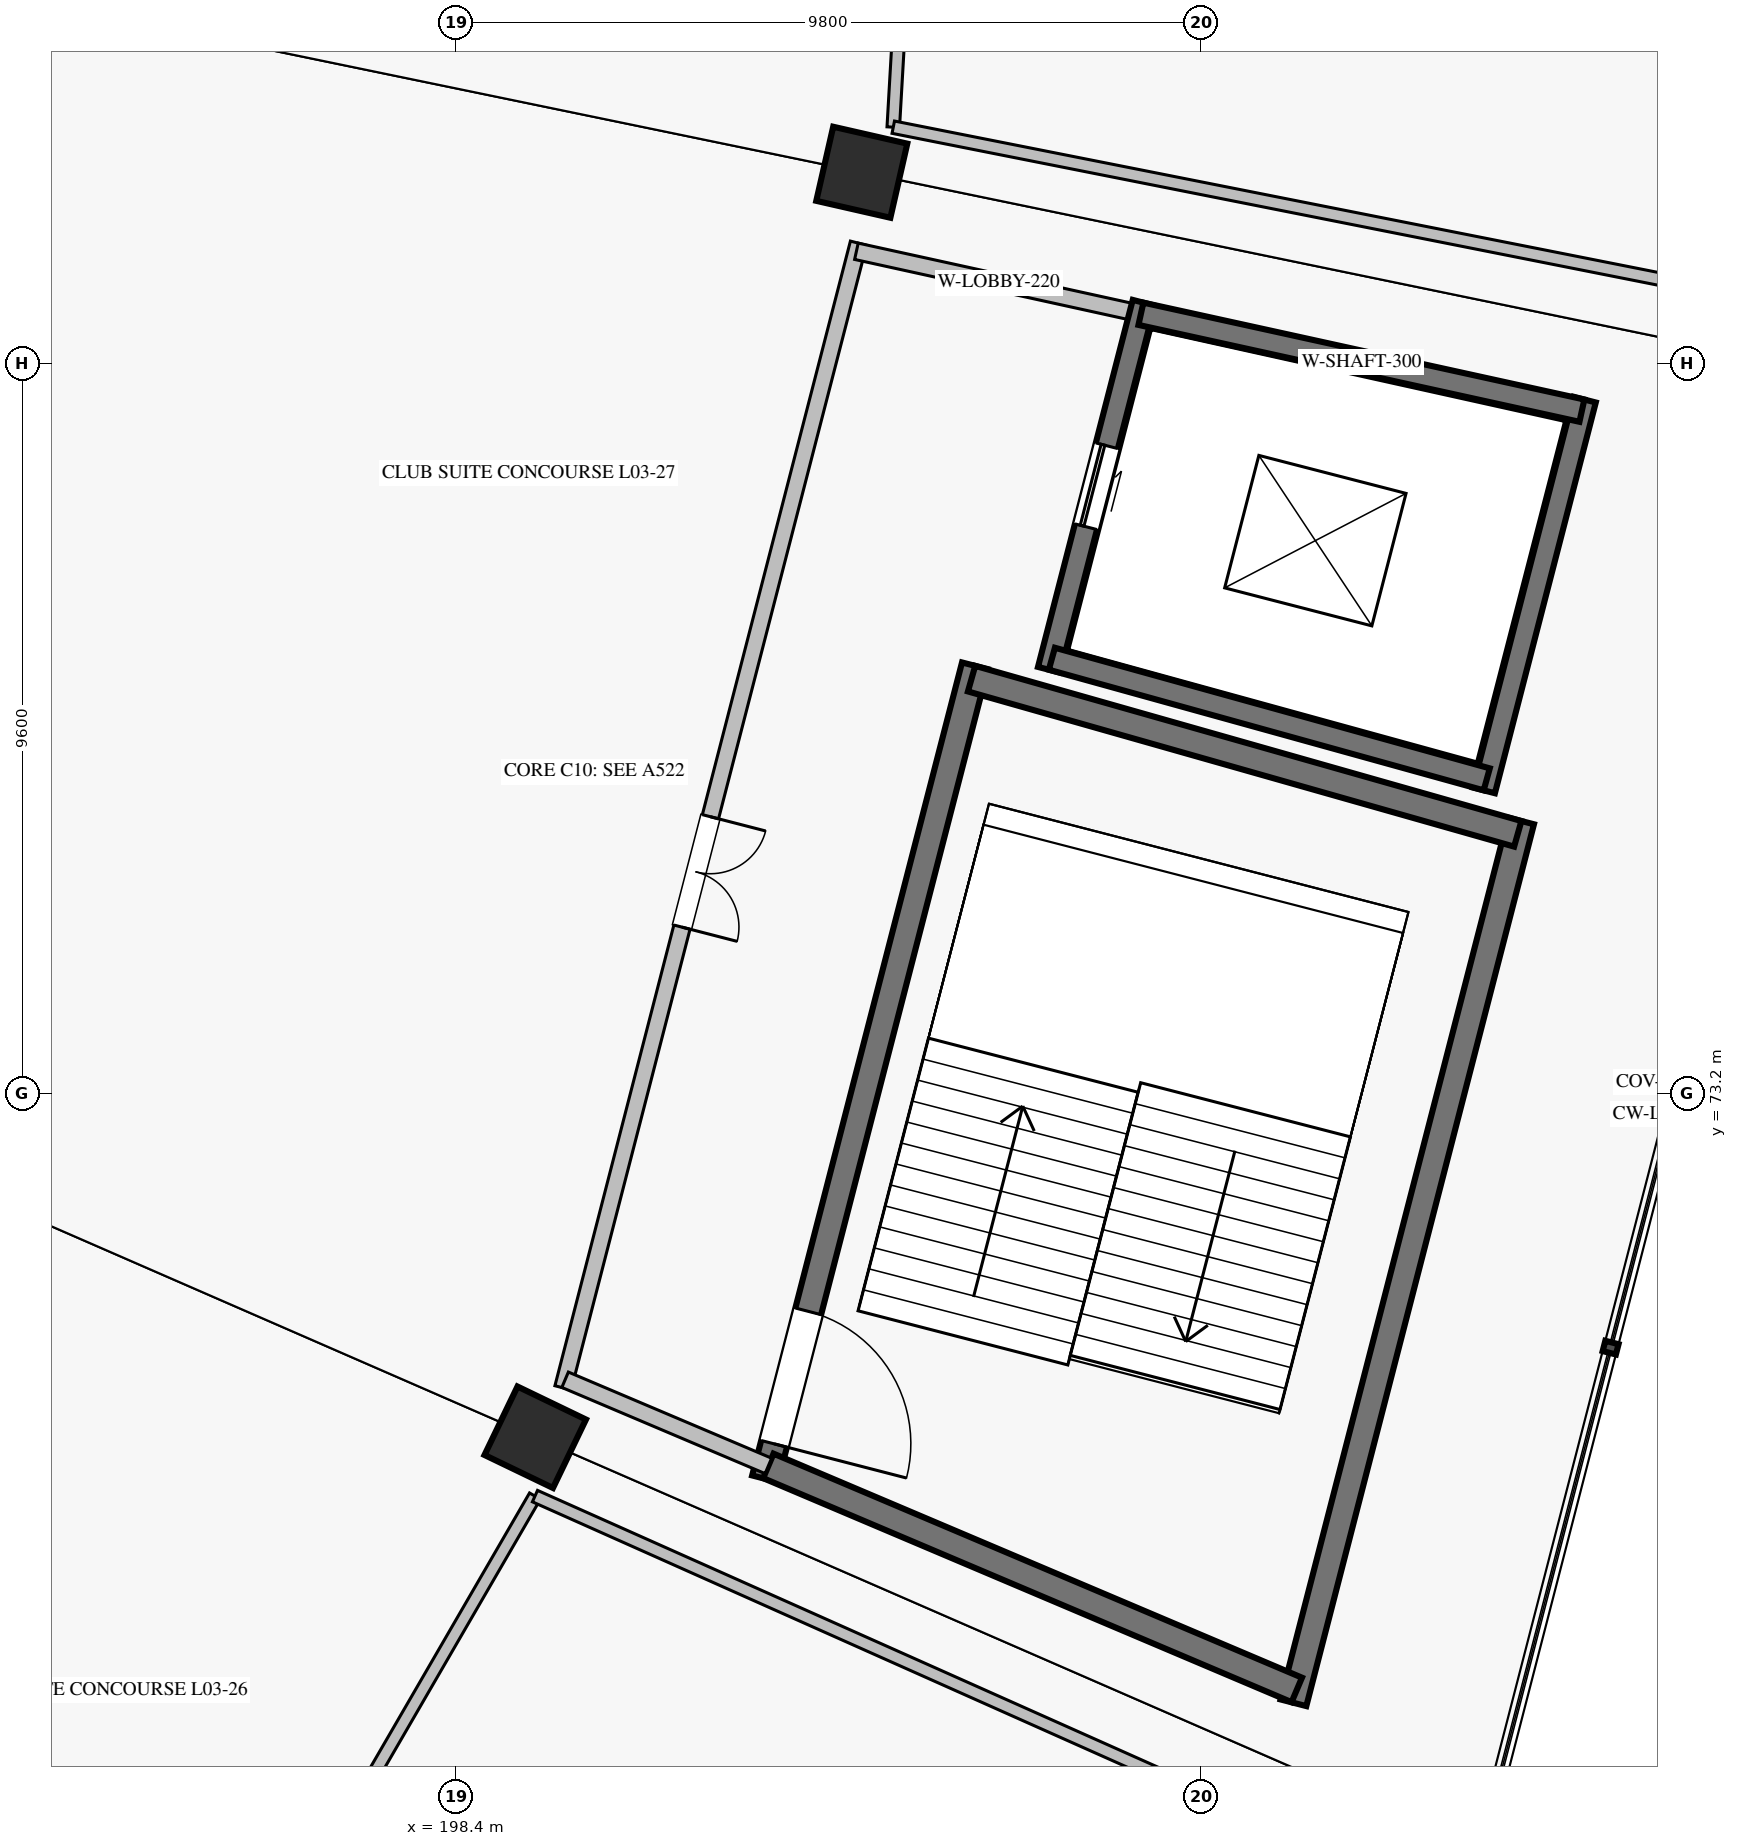
"""IFC4 building model, lengths in metres.
Left out: names, types, materials, properties, quantities, classifications, styles, units other than length and angle.
Written with IfcOpenShell. Run it as: python <this file> out.ifc"""

import sys

from ifc_helpers import new_model, si_unit, direction, frame, frame_2d, origin, origin_2d, place, context, subcontext, project, spatial, rectangle, extrude, element, fill, save


model = new_model("IFC4")
c1 = context("Model", 3, precision=1e-05, world=origin(), true_north=direction((0.0, 1.0)))
c2 = subcontext(c1, "Body", "Model", "MODEL_VIEW")
j1 = project(units=[si_unit("LENGTHUNIT", "METRE"), si_unit("PLANEANGLEUNIT", "RADIAN")], contexts=[c1])
p1 = place(None, origin())
s1 = spatial("IfcSite", under=j1, at=p1, CompositionType="ELEMENT")
p2 = place(p1, origin())
s2 = spatial("IfcBuilding", under=s1, at=p2, CompositionType="ELEMENT")
p3 = place(p2, frame((0.0, 0.0, 15.64)))
s3 = spatial("IfcBuildingStorey", under=s2, at=p3, CompositionType="ELEMENT", Elevation=15.64)
for number, where, z_axis, x_axis in (
    (1, (199.441, 68.675, 0.0), (0.0, 0.0, 1.0), (0.901, -0.434, 0.0)),
    (2, (203.738, 85.318, 0.0), (0.0, 0.0, 1.0), (0.975, -0.223, 0.0)),
):
    element("IfcColumn", number, at=place(p3, frame(where, z_axis=z_axis, x_axis=x_axis)), inside=s3, PredefinedType="COLUMN", context=c2, shape_type="SweptSolid", body=[
        extrude(rectangle(XDim=1.0, YDim=1.0, at=origin_2d()), origin(), (0.0, 0.0, 1.0), 4.76),
    ])
p4 = place(p3, frame((202.464, 68.129, 0.0), z_axis=(0.0, 0.0, 1.0), x_axis=(0.249959564539, 0.968256276042, 0.0)))
e3 = element("IfcWall", 3, at=p4, inside=s3, PredefinedType="SHEAR", context=c2, shape_type="SweptSolid", body=[
    extrude(rectangle(XDim=11.047, YDim=0.35, at=frame_2d((5.523, 0.0))), origin(), (0.0, 0.0, 1.0), 4.46),
])
p5 = place(p4, frame((0.475, 0.0, 0.0)))
e4 = element("IfcOpeningElement", 4, at=p5, cuts=e3, PredefinedType="OPENING", context=c2, shape_type="SweptSolid", body=[
    extrude(rectangle(XDim=1.8, YDim=2.2, at=frame_2d((0.9, 1.1))), frame((0.0, 0.185, 0.0), z_axis=(0.0, -1.0, 0.0), x_axis=(1.0, 0.0, 0.0)), (0.0, 0.0, 1.0), 0.37),
])
p6 = place(p3, frame((209.417, 65.182, 0.0), z_axis=(0.0, 0.0, 1.0), x_axis=(0.249969221583, 0.968253782983, 0.0)))
e5 = element("IfcWall", 5, at=p6, inside=s3, PredefinedType="SHEAR", context=c2, shape_type="SweptSolid", body=[
    extrude(rectangle(XDim=11.982, YDim=0.35, at=frame_2d((5.991, 0.0))), origin(), (0.0, 0.0, 1.0), 4.46),
])
p7 = place(p3, frame((202.508, 68.299, 0.0), z_axis=(0.0, 0.0, 1.0), x_axis=(0.920704667209, -0.390260061728, 0.0)))
e6 = element("IfcWall", 6, at=p7, inside=s3, PredefinedType="SHEAR", context=c2, shape_type="SweptSolid", body=[
    extrude(rectangle(XDim=7.552, YDim=0.35, at=frame_2d((3.776, 0.0))), origin(), (0.0, 0.0, 1.0), 4.46),
])
p8 = place(p3, frame((205.182, 78.656, 0.0), z_axis=(0.0, 0.0, 1.0), x_axis=(0.961945802461, -0.273240321195, 0.0)))
e7 = element("IfcWall", 7, at=p8, inside=s3, PredefinedType="SHEAR", context=c2, shape_type="SweptSolid", body=[
    extrude(rectangle(XDim=7.47, YDim=0.35, at=frame_2d((3.735, 0.0))), origin(), (0.0, 0.0, 1.0), 4.46),
])
p9 = place(p3, frame((206.201, 78.772, 0.0), z_axis=(0.0, 0.0, 1.0), x_axis=(0.249946120621, 0.968259746549, 0.0)))
e8 = element("IfcWall", 8, at=p9, inside=s3, PredefinedType="SHEAR", context=c2, shape_type="SweptSolid", body=[
    extrude(rectangle(XDim=4.987, YDim=0.3, at=frame_2d((2.494, 0.0))), origin(), (0.0, 0.0, 1.0), 4.46),
])
p10 = place(p9, frame((1.944, 0.0, 0.0)))
e9 = element("IfcOpeningElement", 9, at=p10, cuts=e8, PredefinedType="OPENING", context=c2, shape_type="SweptSolid", body=[
    extrude(rectangle(XDim=1.1, YDim=2.2, at=frame_2d((0.55, 1.1))), frame((0.0, 0.16, 0.0), z_axis=(0.0, -1.0, 0.0), x_axis=(1.0, 0.0, 0.0)), (0.0, 0.0, 1.0), 0.32),
])
p11 = place(p3, frame((211.923, 77.186, 0.0), z_axis=(0.0, 0.0, 1.0), x_axis=(0.249918349381, 0.968266914979, 0.0)))
e10 = element("IfcWall", 10, at=p11, inside=s3, PredefinedType="SHEAR", context=c2, shape_type="SweptSolid", body=[
    extrude(rectangle(XDim=5.309, YDim=0.3, at=frame_2d((2.655, 0.0))), origin(), (0.0, 0.0, 1.0), 4.46),
])
p12 = place(p3, frame((206.239, 78.917, 0.0), z_axis=(0.0, 0.0, 1.0), x_axis=(0.963642107639, -0.267196348002, 0.0)))
e11 = element("IfcWall", 11, at=p12, inside=s3, PredefinedType="SHEAR", context=c2, shape_type="SweptSolid", body=[
    extrude(rectangle(XDim=5.937, YDim=0.3, at=frame_2d((2.969, 0.0))), origin(), (0.0, 0.0, 1.0), 4.46),
])
p13 = place(p3, frame((207.41, 83.456, 0.0), z_axis=(0.0, 0.0, 1.0), x_axis=(0.976707381947, -0.214575604509, 0.0)))
e12 = element("IfcWall", 12, at=p13, inside=s3, PredefinedType="SHEAR", context=c2, shape_type="SweptSolid", body=[
    extrude(rectangle(XDim=5.94, YDim=0.3, at=frame_2d((2.97, 0.0))), origin(), (0.0, 0.0, 1.0), 4.46),
])
p14 = place(p3, frame((199.807, 69.325, 0.0), z_axis=(0.0, 0.0, 1.0), x_axis=(0.249963472505, 0.968255267176, 0.0)))
e13 = element("IfcWall", 13, at=p14, inside=s3, PredefinedType="SOLIDWALL", context=c2, shape_type="SweptSolid", body=[
    extrude(rectangle(XDim=15.553, YDim=0.22, at=frame_2d((7.776, 0.0))), origin(), (0.0, 0.0, 1.0), 4.46),
])
p15 = place(p14, frame((6.26, 0.0, 0.0)))
e14 = element("IfcOpeningElement", 14, at=p15, cuts=e13, PredefinedType="OPENING", context=c2, shape_type="SweptSolid", body=[
    extrude(rectangle(XDim=1.5, YDim=2.2, at=frame_2d((0.75, 1.1))), frame((0.0, 0.12, 0.0), z_axis=(0.0, -1.0, 0.0), x_axis=(1.0, 0.0, 0.0)), (0.0, 0.0, 1.0), 0.24),
])
p16 = place(p3, frame((199.834, 69.432, 0.0), z_axis=(0.0, 0.0, 1.0), x_axis=(0.920711790761, -0.390243255361, 0.0)))
e15 = element("IfcWall", 15, at=p16, inside=s3, PredefinedType="SOLIDWALL", context=c2, shape_type="SweptSolid", body=[
    extrude(rectangle(XDim=2.904, YDim=0.22, at=frame_2d((1.452, 0.0))), origin(), (0.0, 0.0, 1.0), 4.46),
])
p17 = place(p3, frame((203.667, 84.278, 0.0), z_axis=(0.0, 0.0, 1.0), x_axis=(0.976714725209, -0.214542176645, 0.0)))
e16 = element("IfcWall", 16, at=p17, inside=s3, PredefinedType="SOLIDWALL", context=c2, shape_type="SweptSolid", body=[
    extrude(rectangle(XDim=3.833, YDim=0.22, at=frame_2d((1.917, 0.0))), origin(), (0.0, 0.0, 1.0), 4.46),
])
p18 = place(p3, frame((191.179, 53.658, 0.0), z_axis=(0.0, 0.0, 1.0), x_axis=(0.501617777052, 0.865089362867, 0.0)))
e17 = element("IfcWall", 17, at=p18, inside=s3, PredefinedType="PARTITIONING", context=c2, shape_type="SweptSolid", body=[
    extrude(rectangle(XDim=16.464, YDim=0.165, at=frame_2d((8.232, 0.0))), origin(), (0.0, 0.0, 1.0), 3.78),
])
p19 = place(p18, frame((7.432, 0.0, 0.0)))
e18 = element("IfcOpeningElement", 18, at=p19, cuts=e17, PredefinedType="OPENING", context=c2, shape_type="SweptSolid", body=[
    extrude(rectangle(XDim=1.6, YDim=2.3, at=frame_2d((0.8, 1.15))), frame((0.0, 0.093, 0.0), z_axis=(0.0, -1.0, 0.0), x_axis=(1.0, 0.0, 0.0)), (0.0, 0.0, 1.0), 0.185),
])
p20 = place(p3, frame((199.438, 67.901, 0.0), z_axis=(0.0, 0.0, 1.0), x_axis=(0.913245562849, -0.407409550621, 0.0)))
e19 = element("IfcWall", 19, at=p20, inside=s3, PredefinedType="PARTITIONING", context=c2, shape_type="SweptSolid", body=[
    extrude(rectangle(XDim=12.4, YDim=0.165, at=frame_2d((6.2, 0.0))), origin(), (0.0, 0.0, 1.0), 3.78),
])
p21 = place(p3, frame((204.152, 85.911, 0.0), z_axis=(0.0, 0.0, 1.0), x_axis=(0.057603503798, 0.998339539611, 0.0)))
e20 = element("IfcWall", 20, at=p21, inside=s3, PredefinedType="PARTITIONING", context=c2, shape_type="SweptSolid", body=[
    extrude(rectangle(XDim=15.444, YDim=0.165, at=frame_2d((7.722, 0.0))), origin(), (0.0, 0.0, 1.0), 3.78),
])
p22 = place(p21, frame((6.922, 0.0, 0.0)))
e21 = element("IfcOpeningElement", 21, at=p22, cuts=e20, PredefinedType="OPENING", context=c2, shape_type="SweptSolid", body=[
    extrude(rectangle(XDim=1.6, YDim=2.3, at=frame_2d((0.8, 1.15))), frame((0.0, 0.093, 0.0), z_axis=(0.0, -1.0, 0.0), x_axis=(1.0, 0.0, 0.0)), (0.0, 0.0, 1.0), 0.185),
])
p23 = place(p3, frame((204.152, 85.911, 0.0), z_axis=(0.0, 0.0, 1.0), x_axis=(0.980904167784, -0.194491680088, 0.0)))
e22 = element("IfcWall", 22, at=p23, inside=s3, PredefinedType="PARTITIONING", context=c2, shape_type="SweptSolid", body=[
    extrude(rectangle(XDim=12.257, YDim=0.165, at=frame_2d((6.128, 0.0))), origin(), (0.0, 0.0, 1.0), 3.78),
])
p24 = place(p5, frame((1.8, 0.0, 0.0), z_axis=(0.0, 0.0, 1.0), x_axis=(-1.0, 0.0, 0.0)))
e23 = element("IfcDoor", 23, at=p24, inside=s3, OperationType="SINGLE_SWING_RIGHT", PredefinedType="DOOR", context=c2, shape_type="SweptSolid", body=[
    extrude(rectangle(XDim=1.8, YDim=2.2, at=frame_2d((0.9, 1.1))), frame((0.0, 0.025, 0.0), z_axis=(0.0, -1.0, 0.0), x_axis=(1.0, 0.0, 0.0)), (0.0, 0.0, 1.0), 0.05),
])
fill(e4, e23)
p25 = place(p10, origin())
e24 = element("IfcDoor", 24, at=p25, inside=s3, OperationType="SLIDING_TO_RIGHT", PredefinedType="DOOR", context=c2, shape_type="SweptSolid", body=[
    extrude(rectangle(XDim=1.1, YDim=2.2, at=frame_2d((0.55, 1.1))), frame((0.0, 0.025, 0.0), z_axis=(0.0, -1.0, 0.0), x_axis=(1.0, 0.0, 0.0)), (0.0, 0.0, 1.0), 0.05),
])
fill(e9, e24)
p26 = place(p15, frame((1.5, 0.0, 0.0), z_axis=(0.0, 0.0, 1.0), x_axis=(-1.0, 0.0, 0.0)))
e25 = element("IfcDoor", 25, at=p26, inside=s3, OperationType="DOUBLE_DOOR_SINGLE_SWING", PredefinedType="DOOR", context=c2, shape_type="SweptSolid", body=[
    extrude(rectangle(XDim=1.5, YDim=2.2, at=frame_2d((0.75, 1.1))), frame((0.0, 0.025, 0.0), z_axis=(0.0, -1.0, 0.0), x_axis=(1.0, 0.0, 0.0)), (0.0, 0.0, 1.0), 0.05),
])
fill(e14, e25)
save(model, sys.argv[1])
